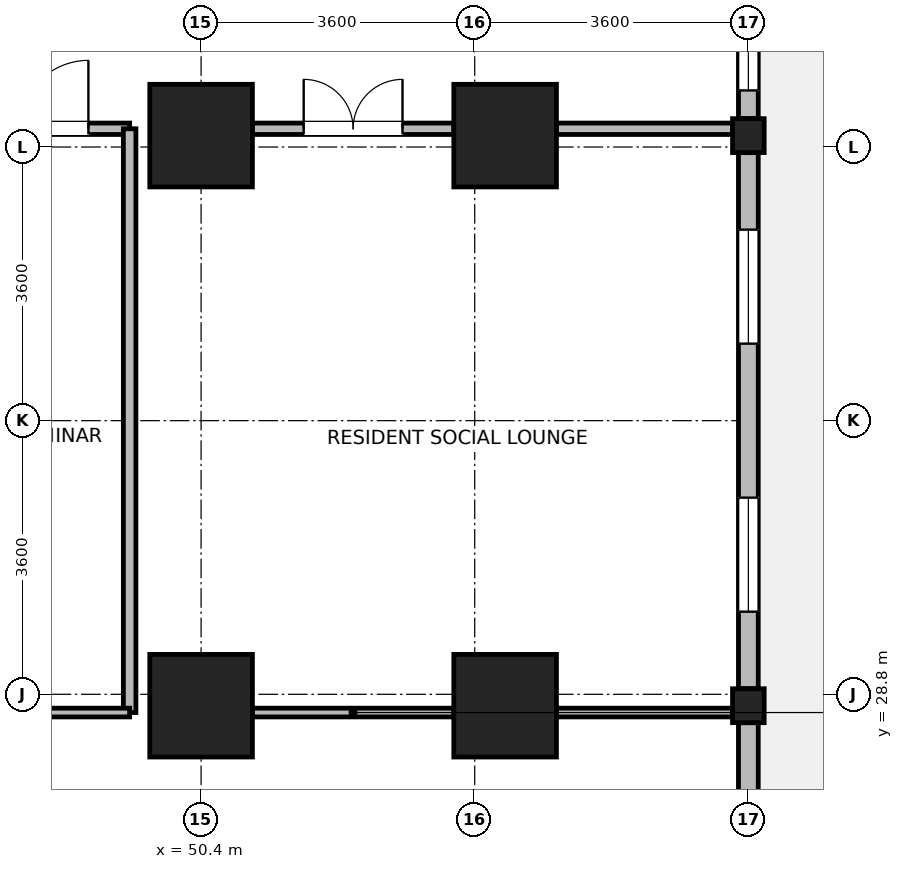
"""IFC4 building model, lengths in metres.
Left out: names, types, materials, properties, quantities, classifications, styles, units other than length and angle.
Written with IfcOpenShell. Run it as: python <this file> out.ifc"""

import sys

from ifc_helpers import new_model, si_unit, direction, frame, frame_2d, origin, origin_2d, place, context, subcontext, project, spatial, rectangle, i_section, extrude, source, transform, mapped, element, fill, save


model = new_model("IFC4")
c1 = context("Model", 3, precision=1e-05, world=origin(), true_north=direction((0.0, 1.0)))
c2 = subcontext(c1, "Body", "Model", "MODEL_VIEW")
j1 = project(units=[si_unit("LENGTHUNIT", "METRE"), si_unit("PLANEANGLEUNIT", "RADIAN")], contexts=[c1])
p1 = place(None, origin())
s1 = spatial("IfcSite", under=j1, at=p1, CompositionType="ELEMENT")
p2 = place(p1, origin())
s2 = spatial("IfcBuilding", under=s1, at=p2, CompositionType="ELEMENT")
p3 = place(p2, frame((0.0, 0.0, 54.9)))
s3 = spatial("IfcBuildingStorey", under=s2, at=p3, CompositionType="ELEMENT", Elevation=54.9)
m1 = source(origin(), c2, "Body", "SweptSolid", [
    extrude(rectangle(XDim=1.35, YDim=1.35, at=origin_2d()), origin(), (0.0, 0.0, 1.0), 3.7),
])
for number, where, z_axis, x_axis in (
    (1, (50.4, 28.65, 0.0), (0.0, 0.0, 1.0), (1.0, 0.0, 0.0)),
    (2, (50.4, 36.15, 0.0), (0.0, 0.0, 1.0), (1.0, 0.0, 0.0)),
    (3, (54.4, 28.65, 0.0), (0.0, 0.0, 1.0), (1.0, 0.0, 0.0)),
    (4, (54.4, 36.15, 0.0), (0.0, 0.0, 1.0), (1.0, 0.0, 0.0)),
):
    element("IfcColumn", number, at=place(p3, frame(where, z_axis=z_axis, x_axis=x_axis)), inside=s3, PredefinedType="COLUMN", context=c2, shape_type="MappedRepresentation", body=[
        mapped(m1, transform((0.0, 0.0, 0.0), x_axis=(1.0, 0.0, 0.0), y_axis=(0.0, 1.0, 0.0), z_axis=(0.0, 0.0, 1.0), scale=1.0)),
    ])
m2 = source(origin(), c2, "Body", "SweptSolid", [
    extrude(i_section(OverallWidth=0.416, OverallDepth=0.446, WebThickness=0.029, FlangeThickness=0.04, FilletRadius=0.015, at=origin_2d()), origin(), (0.0, 0.0, 1.0), 3.7),
])
for number, where, z_axis, x_axis in (
    (5, (57.6, 28.65, 0.0), (0.0, 0.0, 1.0), (1.0, 0.0, 0.0)),
    (6, (57.6, 36.15, 0.0), (0.0, 0.0, 1.0), (1.0, 0.0, 0.0)),
):
    element("IfcColumn", number, at=place(p3, frame(where, z_axis=z_axis, x_axis=x_axis)), inside=s3, PredefinedType="COLUMN", context=c2, shape_type="MappedRepresentation", body=[
        mapped(m2, transform((0.0, 0.0, 0.0), x_axis=(1.0, 0.0, 0.0), y_axis=(0.0, 1.0, 0.0), z_axis=(0.0, 0.0, 1.0), scale=1.0)),
    ])
p4 = place(p3, frame((57.6, 28.426, 0.0), z_axis=(0.0, 0.0, 1.0), x_axis=(0.0, -1.0, 0.0)))
e7 = element("IfcWall", 7, at=p4, inside=s3, PredefinedType="STANDARD", context=c2, shape_type="SweptSolid", body=[
    extrude(rectangle(XDim=6.602, YDim=0.26, at=frame_2d((3.301, 0.0))), origin(), (0.0, 0.0, 1.0), 2.93),
])
p5 = place(p4, frame((4.201, 0.0, 0.85)))
e8 = element("IfcOpeningElement", 8, at=p5, cuts=e7, PredefinedType="OPENING", context=c2, shape_type="SweptSolid", body=[
    extrude(rectangle(XDim=1.5, YDim=1.85, at=frame_2d((0.75, 0.925))), frame((0.0, 0.14, 0.0), z_axis=(0.0, -1.0, 0.0), x_axis=(1.0, 0.0, 0.0)), (0.0, 0.0, 1.0), 0.28),
])
p6 = place(p4, frame((2.826, 0.0, 0.85)))
e9 = element("IfcOpeningElement", 9, at=p6, cuts=e7, PredefinedType="OPENING", context=c2, shape_type="SweptSolid", body=[
    extrude(rectangle(XDim=0.95, YDim=1.75, at=frame_2d((0.475, 0.875))), frame((0.0, 0.14, 0.0), z_axis=(0.0, -1.0, 0.0), x_axis=(1.0, 0.0, 0.0)), (0.0, 0.0, 1.0), 0.28),
])
p7 = place(p3, frame((57.6, 35.926, 0.0), z_axis=(0.0, 0.0, 1.0), x_axis=(0.0, -1.0, 0.0)))
e10 = element("IfcWall", 10, at=p7, inside=s3, PredefinedType="STANDARD", context=c2, shape_type="SweptSolid", body=[
    extrude(rectangle(XDim=7.052, YDim=0.26, at=frame_2d((3.526, 0.0))), origin(), (0.0, 0.0, 1.0), 2.93),
])
p8 = place(p7, frame((1.013, 0.0, 0.85)))
e11 = element("IfcOpeningElement", 11, at=p8, cuts=e10, PredefinedType="OPENING", context=c2, shape_type="SweptSolid", body=[
    extrude(rectangle(XDim=1.5, YDim=1.85, at=frame_2d((0.75, 0.925))), frame((0.0, 0.14, 0.0), z_axis=(0.0, -1.0, 0.0), x_axis=(1.0, 0.0, 0.0)), (0.0, 0.0, 1.0), 0.28),
])
p9 = place(p7, frame((4.539, 0.0, 0.85)))
e12 = element("IfcOpeningElement", 12, at=p9, cuts=e10, PredefinedType="OPENING", context=c2, shape_type="SweptSolid", body=[
    extrude(rectangle(XDim=1.5, YDim=1.85, at=frame_2d((0.75, 0.925))), frame((0.0, 0.14, 0.0), z_axis=(0.0, -1.0, 0.0), x_axis=(1.0, 0.0, 0.0)), (0.0, 0.0, 1.0), 0.28),
])
p10 = place(p3, frame((57.6, 39.73, 0.0), z_axis=(0.0, 0.0, 1.0), x_axis=(0.0, -1.0, 0.0)))
e13 = element("IfcWall", 13, at=p10, inside=s3, PredefinedType="STANDARD", context=c2, shape_type="SweptSolid", body=[
    extrude(rectangle(XDim=3.356, YDim=0.26, at=frame_2d((1.678, 0.0))), origin(), (0.0, 0.0, 1.0), 3.43),
])
p11 = place(p10, frame((2.035, 0.0, 0.85)))
e14 = element("IfcOpeningElement", 14, at=p11, cuts=e13, PredefinedType="OPENING", context=c2, shape_type="SweptSolid", body=[
    extrude(rectangle(XDim=0.95, YDim=1.75, at=frame_2d((0.475, 0.875))), frame((0.0, 0.14, 0.0), z_axis=(0.0, -1.0, 0.0), x_axis=(1.0, 0.0, 0.0)), (0.0, 0.0, 1.0), 0.28),
])
p12 = place(p10, frame((0.263, 0.0, 0.85)))
e15 = element("IfcOpeningElement", 15, at=p12, cuts=e13, PredefinedType="OPENING", context=c2, shape_type="SweptSolid", body=[
    extrude(rectangle(XDim=0.95, YDim=1.75, at=frame_2d((0.475, 0.875))), frame((0.0, 0.14, 0.0), z_axis=(0.0, -1.0, 0.0), x_axis=(1.0, 0.0, 0.0)), (0.0, 0.0, 1.0), 0.28),
])
p13 = place(p3, frame((51.075, 36.24, 0.0), z_axis=(0.0, 0.0, 1.0), x_axis=(1.0, 0.0, 0.0)))
e16 = element("IfcWall", 16, at=p13, inside=s3, PredefinedType="PARTITIONING", context=c2, shape_type="SweptSolid", body=[
    extrude(rectangle(XDim=2.65, YDim=0.15, at=frame_2d((1.325, 0.0))), origin(), (0.0, 0.0, 1.0), 2.78),
])
p14 = place(p13, frame((0.675, 0.0, 0.0)))
e17 = element("IfcOpeningElement", 17, at=p14, cuts=e16, PredefinedType="OPENING", context=c2, shape_type="SweptSolid", body=[
    extrude(rectangle(XDim=1.3, YDim=2.12, at=frame_2d((0.65, 1.06))), frame((0.0, 0.085, 0.0), z_axis=(0.0, -1.0, 0.0), x_axis=(1.0, 0.0, 0.0)), (0.0, 0.0, 1.0), 0.17),
])
p15 = place(p3, frame((55.075, 36.24, 0.0), z_axis=(0.0, 0.0, 1.0), x_axis=(1.0, 0.0, 0.0)))
e18 = element("IfcWall", 18, at=p15, inside=s3, PredefinedType="PARTITIONING", context=c2, shape_type="SweptSolid", body=[
    extrude(rectangle(XDim=2.317, YDim=0.15, at=frame_2d((1.159, 0.0))), origin(), (0.0, 0.0, 1.0), 2.78),
])
p16 = place(p3, frame((47.475, 36.24, 0.0), z_axis=(0.0, 0.0, 1.0), x_axis=(1.0, 0.0, 0.0)))
e19 = element("IfcWall", 19, at=p16, inside=s3, PredefinedType="PARTITIONING", context=c2, shape_type="SweptSolid", body=[
    extrude(rectangle(XDim=1.985, YDim=0.15, at=frame_2d((0.992, 0.0))), origin(), (0.0, 0.0, 1.0), 2.78),
])
p17 = place(p16, frame((0.542, 0.0, 0.0)))
e20 = element("IfcOpeningElement", 20, at=p17, cuts=e19, PredefinedType="OPENING", context=c2, shape_type="SweptSolid", body=[
    extrude(rectangle(XDim=0.9, YDim=2.08, at=frame_2d((0.45, 1.04))), frame((0.0, 0.085, 0.0), z_axis=(0.0, -1.0, 0.0), x_axis=(1.0, 0.0, 0.0)), (0.0, 0.0, 1.0), 0.17),
])
p18 = place(p3, frame((51.075, 28.56, 0.0), z_axis=(0.0, 0.0, 1.0), x_axis=(1.0, 0.0, 0.0)))
e21 = element("IfcWall", 21, at=p18, inside=s3, PredefinedType="PARTITIONING", context=c2, shape_type="SweptSolid", body=[
    extrude(rectangle(XDim=2.65, YDim=0.115, at=frame_2d((1.325, 0.0))), origin(), (0.0, 0.0, 1.0), 2.78),
])
p19 = place(p3, frame((55.075, 28.56, 0.0), z_axis=(0.0, 0.0, 1.0), x_axis=(1.0, 0.0, 0.0)))
e22 = element("IfcWall", 22, at=p19, inside=s3, PredefinedType="PARTITIONING", context=c2, shape_type="SweptSolid", body=[
    extrude(rectangle(XDim=2.317, YDim=0.115, at=frame_2d((1.159, 0.0))), origin(), (0.0, 0.0, 1.0), 2.78),
])
p20 = place(p3, frame((49.46, 28.56, 0.0), z_axis=(0.0, 0.0, 1.0), x_axis=(0.0, 1.0, 0.0)))
e23 = element("IfcWall", 23, at=p20, inside=s3, PredefinedType="PARTITIONING", context=c2, shape_type="SweptSolid", body=[
    extrude(rectangle(XDim=7.68, YDim=0.165, at=frame_2d((3.84, 0.0))), origin(), (0.0, 0.0, 1.0), 3.43),
])
p21 = place(p3, frame((47.475, 28.56, 0.0), z_axis=(0.0, 0.0, 1.0), x_axis=(1.0, 0.0, 0.0)))
e24 = element("IfcWall", 24, at=p21, inside=s3, PredefinedType="PARTITIONING", context=c2, shape_type="SweptSolid", body=[
    extrude(rectangle(XDim=1.985, YDim=0.115, at=frame_2d((0.992, 0.0))), origin(), (0.0, 0.0, 1.0), 2.78),
])
p22 = place(p8, origin())
e25 = element("IfcWindow", 25, at=p22, inside=s3, PartitioningType="SINGLE_PANEL", PredefinedType="WINDOW", context=c2, shape_type="SweptSolid", body=[
    extrude(rectangle(XDim=1.5, YDim=1.85, at=frame_2d((0.75, 0.925))), frame((0.0, 0.03, 0.0), z_axis=(0.0, -1.0, 0.0), x_axis=(1.0, 0.0, 0.0)), (0.0, 0.0, 1.0), 0.06),
])
fill(e11, e25)
p23 = place(p9, origin())
e26 = element("IfcWindow", 26, at=p23, inside=s3, PartitioningType="SINGLE_PANEL", PredefinedType="WINDOW", context=c2, shape_type="SweptSolid", body=[
    extrude(rectangle(XDim=1.5, YDim=1.85, at=frame_2d((0.75, 0.925))), frame((0.0, 0.03, 0.0), z_axis=(0.0, -1.0, 0.0), x_axis=(1.0, 0.0, 0.0)), (0.0, 0.0, 1.0), 0.06),
])
fill(e12, e26)
p24 = place(p11, origin())
e27 = element("IfcWindow", 27, at=p24, inside=s3, PartitioningType="SINGLE_PANEL", PredefinedType="WINDOW", context=c2, shape_type="SweptSolid", body=[
    extrude(rectangle(XDim=0.95, YDim=1.75, at=frame_2d((0.475, 0.875))), frame((0.0, 0.03, 0.0), z_axis=(0.0, -1.0, 0.0), x_axis=(1.0, 0.0, 0.0)), (0.0, 0.0, 1.0), 0.06),
])
fill(e14, e27)
p25 = place(p14, origin())
e28 = element("IfcDoor", 28, at=p25, inside=s3, OperationType="DOUBLE_DOOR_SINGLE_SWING", PredefinedType="DOOR", context=c2, shape_type="SweptSolid", body=[
    extrude(rectangle(XDim=1.3, YDim=2.12, at=frame_2d((0.65, 1.06))), frame((0.0, 0.025, 0.0), z_axis=(0.0, -1.0, 0.0), x_axis=(1.0, 0.0, 0.0)), (0.0, 0.0, 1.0), 0.05),
])
fill(e17, e28)
p26 = place(p17, origin())
e29 = element("IfcDoor", 29, at=p26, inside=s3, OperationType="SINGLE_SWING_RIGHT", PredefinedType="DOOR", context=c2, shape_type="SweptSolid", body=[
    extrude(rectangle(XDim=0.9, YDim=2.08, at=frame_2d((0.45, 1.04))), frame((0.0, 0.025, 0.0), z_axis=(0.0, -1.0, 0.0), x_axis=(1.0, 0.0, 0.0)), (0.0, 0.0, 1.0), 0.05),
])
fill(e20, e29)
save(model, sys.argv[1])
